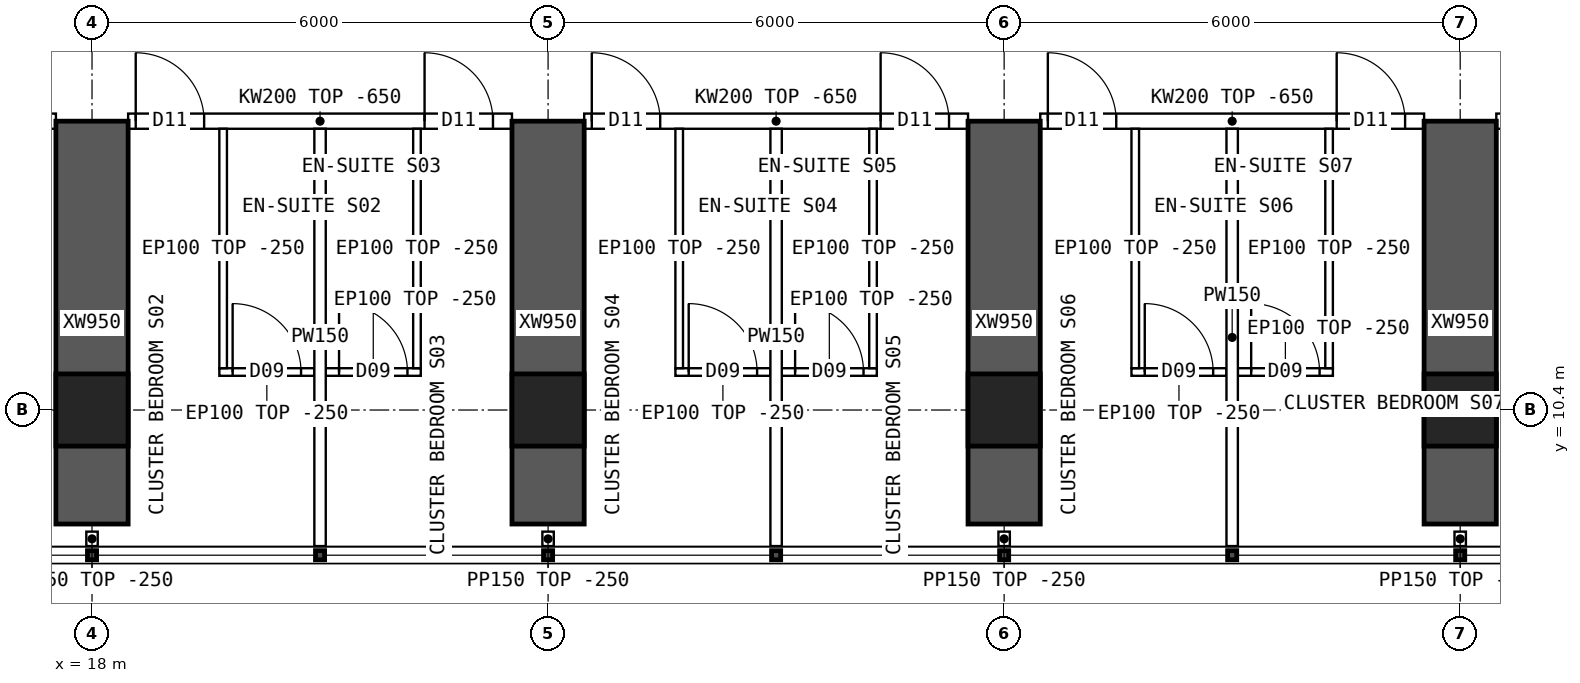
"""IFC4 building model, lengths in metres.
Left out: names, types, materials, properties, quantities, classifications, styles, units other than length and angle.
Written with IfcOpenShell. Run it as: python <this file> out.ifc"""

import sys

from ifc_helpers import new_model, si_unit, direction, frame, frame_2d, origin, origin_2d, place, context, subcontext, project, spatial, polyline, rectangle, hollow_rectangle, outline, extrude, element, fill, save


model = new_model("IFC4")
c1 = context("Model", 3, precision=1e-05, world=origin(), true_north=direction((0.0, 1.0)))
c2 = subcontext(c1, "Body", "Model", "MODEL_VIEW")
j1 = project(units=[si_unit("LENGTHUNIT", "METRE"), si_unit("PLANEANGLEUNIT", "RADIAN")], contexts=[c1])
p1 = place(None, origin())
s1 = spatial("IfcSite", under=j1, at=p1, CompositionType="ELEMENT")
p2 = place(p1, origin())
s2 = spatial("IfcBuilding", under=s1, at=p2, CompositionType="ELEMENT")
p3 = place(p2, frame((0.0, 0.0, 114.4)))
s3 = spatial("IfcBuildingStorey", under=s2, at=p3, CompositionType="ELEMENT", Elevation=114.4)
for number, where, z_axis, x_axis in (
    (1, (18.0, 10.4, 0.0), (0.0, 0.0, 1.0), (1.0, 0.0, 0.0)),
    (2, (24.0, 10.4, 0.0), (0.0, 0.0, 1.0), (1.0, 0.0, 0.0)),
    (3, (30.0, 10.4, 0.0), (0.0, 0.0, 1.0), (1.0, 0.0, 0.0)),
    (4, (36.0, 10.4, 0.0), (0.0, 0.0, 1.0), (1.0, 0.0, 0.0)),
):
    element("IfcColumn", number, at=place(p3, frame(where, z_axis=z_axis, x_axis=x_axis)), inside=s3, PredefinedType="COLUMN", context=c2, shape_type="SweptSolid", body=[
        extrude(hollow_rectangle(XDim=0.95, YDim=0.95, WallThickness=0.095, at=origin_2d()), origin(), (0.0, 0.0, 1.0), 3.75),
    ])
for number, where, z_axis, x_axis in (
    (5, (18.0, 8.9, 0.0), (0.0, 0.0, 1.0), (0.0, 1.0, 0.0)),
    (6, (24.0, 8.9, 0.0), (0.0, 0.0, 1.0), (0.0, 1.0, 0.0)),
    (7, (30.0, 8.9, 0.0), (0.0, 0.0, 1.0), (0.0, 1.0, 0.0)),
    (8, (36.0, 8.9, 0.0), (0.0, 0.0, 1.0), (0.0, 1.0, 0.0)),
):
    element("IfcWall", number, at=place(p3, frame(where, z_axis=z_axis, x_axis=x_axis)), inside=s3, PredefinedType="SHEAR", context=c2, shape_type="SweptSolid", body=[
        extrude(rectangle(XDim=5.3, YDim=0.95, at=frame_2d((2.65, 0.0))), origin(), (0.0, 0.0, 1.0), 3.75),
    ])
p4 = place(p3, frame((12.475, 14.2, 0.0), z_axis=(0.0, 0.0, 1.0), x_axis=(1.0, 0.0, 0.0)))
e9 = element("IfcWall", 9, at=p4, inside=s3, PredefinedType="SOLIDWALL", context=c2, shape_type="SweptSolid", body=[
    extrude(outline(polyline([(0.0, 0.0), (5.05, 0.0), (5.05, 3.1), (0.0, 3.1), (0.0, 0.0)])), frame((0.0, 0.1, 0.0), z_axis=(0.0, -1.0, 0.0), x_axis=(1.0, 0.0, 0.0)), (0.0, 0.0, 1.0), 0.2),
])
p5 = place(p4, frame((0.1, 0.0, 0.0)))
e10 = element("IfcOpeningElement", 10, at=p5, cuts=e9, PredefinedType="OPENING", context=c2, shape_type="SweptSolid", body=[
    extrude(rectangle(XDim=0.9, YDim=2.1, at=frame_2d((0.45, 1.05))), frame((0.0, 0.11, 0.0), z_axis=(0.0, -1.0, 0.0), x_axis=(1.0, 0.0, 0.0)), (0.0, 0.0, 1.0), 0.22),
])
p6 = place(p4, frame((3.9, 0.0, 0.0)))
e11 = element("IfcOpeningElement", 11, at=p6, cuts=e9, PredefinedType="OPENING", context=c2, shape_type="SweptSolid", body=[
    extrude(rectangle(XDim=0.9, YDim=2.1, at=frame_2d((0.45, 1.05))), frame((0.0, 0.11, 0.0), z_axis=(0.0, -1.0, 0.0), x_axis=(1.0, 0.0, 0.0)), (0.0, 0.0, 1.0), 0.22),
])
p7 = place(p3, frame((18.475, 14.2, 0.0), z_axis=(0.0, 0.0, 1.0), x_axis=(1.0, 0.0, 0.0)))
e12 = element("IfcWall", 12, at=p7, inside=s3, PredefinedType="SOLIDWALL", context=c2, shape_type="SweptSolid", body=[
    extrude(outline(polyline([(0.0, 0.0), (5.05, 0.0), (5.05, 3.1), (0.0, 3.1), (0.0, 0.0)])), frame((0.0, 0.1, 0.0), z_axis=(0.0, -1.0, 0.0), x_axis=(1.0, 0.0, 0.0)), (0.0, 0.0, 1.0), 0.2),
])
p8 = place(p7, frame((0.1, 0.0, 0.0)))
e13 = element("IfcOpeningElement", 13, at=p8, cuts=e12, PredefinedType="OPENING", context=c2, shape_type="SweptSolid", body=[
    extrude(rectangle(XDim=0.9, YDim=2.1, at=frame_2d((0.45, 1.05))), frame((0.0, 0.11, 0.0), z_axis=(0.0, -1.0, 0.0), x_axis=(1.0, 0.0, 0.0)), (0.0, 0.0, 1.0), 0.22),
])
p9 = place(p7, frame((3.9, 0.0, 0.0)))
e14 = element("IfcOpeningElement", 14, at=p9, cuts=e12, PredefinedType="OPENING", context=c2, shape_type="SweptSolid", body=[
    extrude(rectangle(XDim=0.9, YDim=2.1, at=frame_2d((0.45, 1.05))), frame((0.0, 0.11, 0.0), z_axis=(0.0, -1.0, 0.0), x_axis=(1.0, 0.0, 0.0)), (0.0, 0.0, 1.0), 0.22),
])
p10 = place(p3, frame((24.475, 14.2, 0.0), z_axis=(0.0, 0.0, 1.0), x_axis=(1.0, 0.0, 0.0)))
e15 = element("IfcWall", 15, at=p10, inside=s3, PredefinedType="SOLIDWALL", context=c2, shape_type="SweptSolid", body=[
    extrude(outline(polyline([(0.0, 0.0), (5.05, 0.0), (5.05, 3.1), (0.0, 3.1), (0.0, 0.0)])), frame((0.0, 0.1, 0.0), z_axis=(0.0, -1.0, 0.0), x_axis=(1.0, 0.0, 0.0)), (0.0, 0.0, 1.0), 0.2),
])
p11 = place(p10, frame((0.1, 0.0, 0.0)))
e16 = element("IfcOpeningElement", 16, at=p11, cuts=e15, PredefinedType="OPENING", context=c2, shape_type="SweptSolid", body=[
    extrude(rectangle(XDim=0.9, YDim=2.1, at=frame_2d((0.45, 1.05))), frame((0.0, 0.11, 0.0), z_axis=(0.0, -1.0, 0.0), x_axis=(1.0, 0.0, 0.0)), (0.0, 0.0, 1.0), 0.22),
])
p12 = place(p10, frame((3.9, 0.0, 0.0)))
e17 = element("IfcOpeningElement", 17, at=p12, cuts=e15, PredefinedType="OPENING", context=c2, shape_type="SweptSolid", body=[
    extrude(rectangle(XDim=0.9, YDim=2.1, at=frame_2d((0.45, 1.05))), frame((0.0, 0.11, 0.0), z_axis=(0.0, -1.0, 0.0), x_axis=(1.0, 0.0, 0.0)), (0.0, 0.0, 1.0), 0.22),
])
p13 = place(p3, frame((30.475, 14.2, 0.0), z_axis=(0.0, 0.0, 1.0), x_axis=(1.0, 0.0, 0.0)))
e18 = element("IfcWall", 18, at=p13, inside=s3, PredefinedType="SOLIDWALL", context=c2, shape_type="SweptSolid", body=[
    extrude(outline(polyline([(0.0, 0.0), (5.05, 0.0), (5.05, 3.1), (0.0, 3.1), (0.0, 0.0)])), frame((0.0, 0.1, 0.0), z_axis=(0.0, -1.0, 0.0), x_axis=(1.0, 0.0, 0.0)), (0.0, 0.0, 1.0), 0.2),
])
p14 = place(p13, frame((0.1, 0.0, 0.0)))
e19 = element("IfcOpeningElement", 19, at=p14, cuts=e18, PredefinedType="OPENING", context=c2, shape_type="SweptSolid", body=[
    extrude(rectangle(XDim=0.9, YDim=2.1, at=frame_2d((0.45, 1.05))), frame((0.0, 0.11, 0.0), z_axis=(0.0, -1.0, 0.0), x_axis=(1.0, 0.0, 0.0)), (0.0, 0.0, 1.0), 0.22),
])
p15 = place(p13, frame((3.9, 0.0, 0.0)))
e20 = element("IfcOpeningElement", 20, at=p15, cuts=e18, PredefinedType="OPENING", context=c2, shape_type="SweptSolid", body=[
    extrude(rectangle(XDim=0.9, YDim=2.1, at=frame_2d((0.45, 1.05))), frame((0.0, 0.11, 0.0), z_axis=(0.0, -1.0, 0.0), x_axis=(1.0, 0.0, 0.0)), (0.0, 0.0, 1.0), 0.22),
])
p16 = place(p3, frame((36.475, 14.2, 0.0), z_axis=(0.0, 0.0, 1.0), x_axis=(1.0, 0.0, 0.0)))
e21 = element("IfcWall", 21, at=p16, inside=s3, PredefinedType="SOLIDWALL", context=c2, shape_type="SweptSolid", body=[
    extrude(outline(polyline([(0.0, 0.0), (5.05, 0.0), (5.05, 3.1), (0.0, 3.1), (0.0, 0.0)])), frame((0.0, 0.1, 0.0), z_axis=(0.0, -1.0, 0.0), x_axis=(1.0, 0.0, 0.0)), (0.0, 0.0, 1.0), 0.2),
])
p17 = place(p16, frame((0.3, 0.0, 0.0)))
e22 = element("IfcOpeningElement", 22, at=p17, cuts=e21, PredefinedType="OPENING", context=c2, shape_type="SweptSolid", body=[
    extrude(rectangle(XDim=1.0, YDim=2.1, at=frame_2d((0.5, 1.05))), frame((0.0, 0.11, 0.0), z_axis=(0.0, -1.0, 0.0), x_axis=(1.0, 0.0, 0.0)), (0.0, 0.0, 1.0), 0.22),
])
p18 = place(p3, frame((21.0, 8.61, 0.0), z_axis=(0.0, 0.0, 1.0), x_axis=(0.0, 1.0, 0.0)))
e23 = element("IfcWall", 23, at=p18, inside=s3, PredefinedType="PARTITIONING", context=c2, shape_type="SweptSolid", body=[
    extrude(outline(polyline([(0.0, 0.0), (5.49, 0.0), (5.49, 3.1), (5.442, 3.1), (5.44, 3.5), (1.992, 3.5), (1.99, 3.1), (1.592, 3.1), (1.59, 3.5), (0.0, 3.5), (0.0, 0.0)])), frame((0.0, 0.075, 0.0), z_axis=(0.0, -1.0, 0.0), x_axis=(1.0, 0.0, 0.0)), (0.0, 0.0, 1.0), 0.15),
])
p19 = place(p3, frame((20.925, 10.9, 0.0), z_axis=(0.0, 0.0, 1.0), x_axis=(-1.0, 0.0, 0.0)))
e24 = element("IfcWall", 24, at=p19, inside=s3, PredefinedType="PARTITIONING", context=c2, shape_type="SweptSolid", body=[
    extrude(rectangle(XDim=1.25, YDim=0.1, at=frame_2d((0.625, 0.0))), origin(), (0.0, 0.0, 1.0), 3.5),
])
p20 = place(p19, frame((0.175, 0.0, 0.0)))
e25 = element("IfcOpeningElement", 25, at=p20, cuts=e24, PredefinedType="OPENING", context=c2, shape_type="SweptSolid", body=[
    extrude(rectangle(XDim=0.9, YDim=2.1, at=frame_2d((0.45, 1.05))), frame((0.0, 0.06, 0.0), z_axis=(0.0, -1.0, 0.0), x_axis=(1.0, 0.0, 0.0)), (0.0, 0.0, 1.0), 0.12),
])
p21 = place(p3, frame((19.725, 10.95, 0.0), z_axis=(0.0, 0.0, 1.0), x_axis=(0.0, 1.0, 0.0)))
e26 = element("IfcWall", 26, at=p21, inside=s3, PredefinedType="PARTITIONING", context=c2, shape_type="SweptSolid", body=[
    extrude(outline(polyline([(0.0, 0.0), (3.15, 0.0), (3.15, 3.1), (3.102, 3.1), (3.1, 3.5), (0.0, 3.5), (0.0, 0.0)])), frame((0.0, 0.05, 0.0), z_axis=(0.0, -1.0, 0.0), x_axis=(1.0, 0.0, 0.0)), (0.0, 0.0, 1.0), 0.1),
])
p22 = place(p3, frame((22.325, 10.9, 0.0), z_axis=(0.0, 0.0, 1.0), x_axis=(-1.0, 0.0, 0.0)))
e27 = element("IfcWall", 27, at=p22, inside=s3, PredefinedType="PARTITIONING", context=c2, shape_type="SweptSolid", body=[
    extrude(rectangle(XDim=1.25, YDim=0.1, at=frame_2d((0.625, 0.0))), origin(), (0.0, 0.0, 1.0), 3.5),
])
p23 = place(p22, frame((0.175, 0.0, 0.0)))
e28 = element("IfcOpeningElement", 28, at=p23, cuts=e27, PredefinedType="OPENING", context=c2, shape_type="SweptSolid", body=[
    extrude(rectangle(XDim=0.9, YDim=2.1, at=frame_2d((0.45, 1.05))), frame((0.0, 0.06, 0.0), z_axis=(0.0, -1.0, 0.0), x_axis=(1.0, 0.0, 0.0)), (0.0, 0.0, 1.0), 0.12),
])
p24 = place(p3, frame((22.275, 10.95, 0.0), z_axis=(0.0, 0.0, 1.0), x_axis=(0.0, 1.0, 0.0)))
e29 = element("IfcWall", 29, at=p24, inside=s3, PredefinedType="PARTITIONING", context=c2, shape_type="SweptSolid", body=[
    extrude(outline(polyline([(0.0, 0.0), (3.15, 0.0), (3.15, 3.1), (3.102, 3.1), (3.1, 3.5), (0.0, 3.5), (0.0, 0.0)])), frame((0.0, 0.05, 0.0), z_axis=(0.0, -1.0, 0.0), x_axis=(1.0, 0.0, 0.0)), (0.0, 0.0, 1.0), 0.1),
])
p25 = place(p3, frame((27.0, 8.61, 0.0), z_axis=(0.0, 0.0, 1.0), x_axis=(0.0, 1.0, 0.0)))
e30 = element("IfcWall", 30, at=p25, inside=s3, PredefinedType="PARTITIONING", context=c2, shape_type="SweptSolid", body=[
    extrude(outline(polyline([(0.0, 0.0), (5.49, 0.0), (5.49, 3.1), (5.442, 3.1), (5.44, 3.5), (1.992, 3.5), (1.99, 3.1), (1.592, 3.1), (1.59, 3.5), (0.0, 3.5), (0.0, 0.0)])), frame((0.0, 0.075, 0.0), z_axis=(0.0, -1.0, 0.0), x_axis=(1.0, 0.0, 0.0)), (0.0, 0.0, 1.0), 0.15),
])
p26 = place(p3, frame((26.925, 10.9, 0.0), z_axis=(0.0, 0.0, 1.0), x_axis=(-1.0, 0.0, 0.0)))
e31 = element("IfcWall", 31, at=p26, inside=s3, PredefinedType="PARTITIONING", context=c2, shape_type="SweptSolid", body=[
    extrude(rectangle(XDim=1.25, YDim=0.1, at=frame_2d((0.625, 0.0))), origin(), (0.0, 0.0, 1.0), 3.5),
])
p27 = place(p26, frame((0.175, 0.0, 0.0)))
e32 = element("IfcOpeningElement", 32, at=p27, cuts=e31, PredefinedType="OPENING", context=c2, shape_type="SweptSolid", body=[
    extrude(rectangle(XDim=0.9, YDim=2.1, at=frame_2d((0.45, 1.05))), frame((0.0, 0.06, 0.0), z_axis=(0.0, -1.0, 0.0), x_axis=(1.0, 0.0, 0.0)), (0.0, 0.0, 1.0), 0.12),
])
p28 = place(p3, frame((25.725, 10.95, 0.0), z_axis=(0.0, 0.0, 1.0), x_axis=(0.0, 1.0, 0.0)))
e33 = element("IfcWall", 33, at=p28, inside=s3, PredefinedType="PARTITIONING", context=c2, shape_type="SweptSolid", body=[
    extrude(outline(polyline([(0.0, 0.0), (3.15, 0.0), (3.15, 3.1), (3.102, 3.1), (3.1, 3.5), (0.0, 3.5), (0.0, 0.0)])), frame((0.0, 0.05, 0.0), z_axis=(0.0, -1.0, 0.0), x_axis=(1.0, 0.0, 0.0)), (0.0, 0.0, 1.0), 0.1),
])
p29 = place(p3, frame((28.325, 10.9, 0.0), z_axis=(0.0, 0.0, 1.0), x_axis=(-1.0, 0.0, 0.0)))
e34 = element("IfcWall", 34, at=p29, inside=s3, PredefinedType="PARTITIONING", context=c2, shape_type="SweptSolid", body=[
    extrude(rectangle(XDim=1.25, YDim=0.1, at=frame_2d((0.625, 0.0))), origin(), (0.0, 0.0, 1.0), 3.5),
])
p30 = place(p29, frame((0.175, 0.0, 0.0)))
e35 = element("IfcOpeningElement", 35, at=p30, cuts=e34, PredefinedType="OPENING", context=c2, shape_type="SweptSolid", body=[
    extrude(rectangle(XDim=0.9, YDim=2.1, at=frame_2d((0.45, 1.05))), frame((0.0, 0.06, 0.0), z_axis=(0.0, -1.0, 0.0), x_axis=(1.0, 0.0, 0.0)), (0.0, 0.0, 1.0), 0.12),
])
p31 = place(p3, frame((28.275, 10.95, 0.0), z_axis=(0.0, 0.0, 1.0), x_axis=(0.0, 1.0, 0.0)))
e36 = element("IfcWall", 36, at=p31, inside=s3, PredefinedType="PARTITIONING", context=c2, shape_type="SweptSolid", body=[
    extrude(outline(polyline([(0.0, 0.0), (3.15, 0.0), (3.15, 3.1), (3.102, 3.1), (3.1, 3.5), (0.0, 3.5), (0.0, 0.0)])), frame((0.0, 0.05, 0.0), z_axis=(0.0, -1.0, 0.0), x_axis=(1.0, 0.0, 0.0)), (0.0, 0.0, 1.0), 0.1),
])
p32 = place(p3, frame((33.0, 8.61, 0.0), z_axis=(0.0, 0.0, 1.0), x_axis=(0.0, 1.0, 0.0)))
e37 = element("IfcWall", 37, at=p32, inside=s3, PredefinedType="PARTITIONING", context=c2, shape_type="SweptSolid", body=[
    extrude(outline(polyline([(0.0, 0.0), (5.49, 0.0), (5.49, 3.1), (5.442, 3.1), (5.44, 3.5), (1.992, 3.5), (1.99, 3.1), (1.592, 3.1), (1.59, 3.5), (0.0, 3.5), (0.0, 0.0)])), frame((0.0, 0.075, 0.0), z_axis=(0.0, -1.0, 0.0), x_axis=(1.0, 0.0, 0.0)), (0.0, 0.0, 1.0), 0.15),
])
p33 = place(p3, frame((32.925, 10.9, 0.0), z_axis=(0.0, 0.0, 1.0), x_axis=(-1.0, 0.0, 0.0)))
e38 = element("IfcWall", 38, at=p33, inside=s3, PredefinedType="PARTITIONING", context=c2, shape_type="SweptSolid", body=[
    extrude(rectangle(XDim=1.25, YDim=0.1, at=frame_2d((0.625, 0.0))), origin(), (0.0, 0.0, 1.0), 3.5),
])
p34 = place(p33, frame((0.175, 0.0, 0.0)))
e39 = element("IfcOpeningElement", 39, at=p34, cuts=e38, PredefinedType="OPENING", context=c2, shape_type="SweptSolid", body=[
    extrude(rectangle(XDim=0.9, YDim=2.1, at=frame_2d((0.45, 1.05))), frame((0.0, 0.06, 0.0), z_axis=(0.0, -1.0, 0.0), x_axis=(1.0, 0.0, 0.0)), (0.0, 0.0, 1.0), 0.12),
])
p35 = place(p3, frame((31.725, 10.95, 0.0), z_axis=(0.0, 0.0, 1.0), x_axis=(0.0, 1.0, 0.0)))
e40 = element("IfcWall", 40, at=p35, inside=s3, PredefinedType="PARTITIONING", context=c2, shape_type="SweptSolid", body=[
    extrude(outline(polyline([(0.0, 0.0), (3.15, 0.0), (3.15, 3.1), (3.102, 3.1), (3.1, 3.5), (0.0, 3.5), (0.0, 0.0)])), frame((0.0, 0.05, 0.0), z_axis=(0.0, -1.0, 0.0), x_axis=(1.0, 0.0, 0.0)), (0.0, 0.0, 1.0), 0.1),
])
p36 = place(p3, frame((34.325, 10.9, 0.0), z_axis=(0.0, 0.0, 1.0), x_axis=(-1.0, 0.0, 0.0)))
e41 = element("IfcWall", 41, at=p36, inside=s3, PredefinedType="PARTITIONING", context=c2, shape_type="SweptSolid", body=[
    extrude(rectangle(XDim=1.25, YDim=0.1, at=frame_2d((0.625, 0.0))), origin(), (0.0, 0.0, 1.0), 3.5),
])
p37 = place(p36, frame((0.175, 0.0, 0.0)))
e42 = element("IfcOpeningElement", 42, at=p37, cuts=e41, PredefinedType="OPENING", context=c2, shape_type="SweptSolid", body=[
    extrude(rectangle(XDim=0.9, YDim=2.1, at=frame_2d((0.45, 1.05))), frame((0.0, 0.06, 0.0), z_axis=(0.0, -1.0, 0.0), x_axis=(1.0, 0.0, 0.0)), (0.0, 0.0, 1.0), 0.12),
])
p38 = place(p3, frame((34.275, 10.95, 0.0), z_axis=(0.0, 0.0, 1.0), x_axis=(0.0, 1.0, 0.0)))
e43 = element("IfcWall", 43, at=p38, inside=s3, PredefinedType="PARTITIONING", context=c2, shape_type="SweptSolid", body=[
    extrude(outline(polyline([(0.0, 0.0), (3.15, 0.0), (3.15, 3.1), (3.102, 3.1), (3.1, 3.5), (0.0, 3.5), (0.0, 0.0)])), frame((0.0, 0.05, 0.0), z_axis=(0.0, -1.0, 0.0), x_axis=(1.0, 0.0, 0.0)), (0.0, 0.0, 1.0), 0.1),
])
for number, where, z_axis, x_axis in (
    (44, (18.0, 8.8, 0.0), (0.0, 0.0, 1.0), (0.0, -1.0, 0.0)),
    (45, (24.0, 8.8, 0.0), (0.0, 0.0, 1.0), (0.0, -1.0, 0.0)),
    (46, (30.0, 8.8, 0.0), (0.0, 0.0, 1.0), (0.0, -1.0, 0.0)),
    (47, (36.0, 8.8, 0.0), (0.0, 0.0, 1.0), (0.0, -1.0, 0.0)),
):
    element("IfcWall", number, at=place(p3, frame(where, z_axis=z_axis, x_axis=x_axis)), inside=s3, PredefinedType="PARTITIONING", context=c2, shape_type="SweptSolid", body=[
        extrude(rectangle(XDim=0.19, YDim=0.15, at=frame_2d((0.095, 0.0))), origin(), (0.0, 0.0, 1.0), 3.5),
    ])
p39 = place(p20, origin())
e48 = element("IfcDoor", 48, at=p39, inside=s3, OperationType="SINGLE_SWING_RIGHT", PredefinedType="DOOR", context=c2, shape_type="SweptSolid", body=[
    extrude(rectangle(XDim=0.9, YDim=2.1, at=frame_2d((0.45, 1.05))), frame((0.0, 0.025, 0.0), z_axis=(0.0, -1.0, 0.0), x_axis=(1.0, 0.0, 0.0)), (0.0, 0.0, 1.0), 0.05),
])
fill(e25, e48)
p40 = place(p8, origin())
e49 = element("IfcDoor", 49, at=p40, inside=s3, OperationType="SINGLE_SWING_LEFT", PredefinedType="DOOR", context=c2, shape_type="SweptSolid", body=[
    extrude(rectangle(XDim=0.9, YDim=2.1, at=frame_2d((0.45, 1.05))), frame((0.0, 0.025, 0.0), z_axis=(0.0, -1.0, 0.0), x_axis=(1.0, 0.0, 0.0)), (0.0, 0.0, 1.0), 0.05),
])
fill(e13, e49)
p41 = place(p23, origin())
e50 = element("IfcDoor", 50, at=p41, inside=s3, OperationType="SINGLE_SWING_RIGHT", PredefinedType="DOOR", context=c2, shape_type="SweptSolid", body=[
    extrude(rectangle(XDim=0.9, YDim=2.1, at=frame_2d((0.45, 1.05))), frame((0.0, 0.025, 0.0), z_axis=(0.0, -1.0, 0.0), x_axis=(1.0, 0.0, 0.0)), (0.0, 0.0, 1.0), 0.05),
])
fill(e28, e50)
p42 = place(p9, origin())
e51 = element("IfcDoor", 51, at=p42, inside=s3, OperationType="SINGLE_SWING_LEFT", PredefinedType="DOOR", context=c2, shape_type="SweptSolid", body=[
    extrude(rectangle(XDim=0.9, YDim=2.1, at=frame_2d((0.45, 1.05))), frame((0.0, 0.025, 0.0), z_axis=(0.0, -1.0, 0.0), x_axis=(1.0, 0.0, 0.0)), (0.0, 0.0, 1.0), 0.05),
])
fill(e14, e51)
p43 = place(p27, origin())
e52 = element("IfcDoor", 52, at=p43, inside=s3, OperationType="SINGLE_SWING_RIGHT", PredefinedType="DOOR", context=c2, shape_type="SweptSolid", body=[
    extrude(rectangle(XDim=0.9, YDim=2.1, at=frame_2d((0.45, 1.05))), frame((0.0, 0.025, 0.0), z_axis=(0.0, -1.0, 0.0), x_axis=(1.0, 0.0, 0.0)), (0.0, 0.0, 1.0), 0.05),
])
fill(e32, e52)
p44 = place(p11, origin())
e53 = element("IfcDoor", 53, at=p44, inside=s3, OperationType="SINGLE_SWING_LEFT", PredefinedType="DOOR", context=c2, shape_type="SweptSolid", body=[
    extrude(rectangle(XDim=0.9, YDim=2.1, at=frame_2d((0.45, 1.05))), frame((0.0, 0.025, 0.0), z_axis=(0.0, -1.0, 0.0), x_axis=(1.0, 0.0, 0.0)), (0.0, 0.0, 1.0), 0.05),
])
fill(e16, e53)
p45 = place(p30, origin())
e54 = element("IfcDoor", 54, at=p45, inside=s3, OperationType="SINGLE_SWING_RIGHT", PredefinedType="DOOR", context=c2, shape_type="SweptSolid", body=[
    extrude(rectangle(XDim=0.9, YDim=2.1, at=frame_2d((0.45, 1.05))), frame((0.0, 0.025, 0.0), z_axis=(0.0, -1.0, 0.0), x_axis=(1.0, 0.0, 0.0)), (0.0, 0.0, 1.0), 0.05),
])
fill(e35, e54)
p46 = place(p12, origin())
e55 = element("IfcDoor", 55, at=p46, inside=s3, OperationType="SINGLE_SWING_LEFT", PredefinedType="DOOR", context=c2, shape_type="SweptSolid", body=[
    extrude(rectangle(XDim=0.9, YDim=2.1, at=frame_2d((0.45, 1.05))), frame((0.0, 0.025, 0.0), z_axis=(0.0, -1.0, 0.0), x_axis=(1.0, 0.0, 0.0)), (0.0, 0.0, 1.0), 0.05),
])
fill(e17, e55)
p47 = place(p34, origin())
e56 = element("IfcDoor", 56, at=p47, inside=s3, OperationType="SINGLE_SWING_RIGHT", PredefinedType="DOOR", context=c2, shape_type="SweptSolid", body=[
    extrude(rectangle(XDim=0.9, YDim=2.1, at=frame_2d((0.45, 1.05))), frame((0.0, 0.025, 0.0), z_axis=(0.0, -1.0, 0.0), x_axis=(1.0, 0.0, 0.0)), (0.0, 0.0, 1.0), 0.05),
])
fill(e39, e56)
p48 = place(p14, origin())
e57 = element("IfcDoor", 57, at=p48, inside=s3, OperationType="SINGLE_SWING_LEFT", PredefinedType="DOOR", context=c2, shape_type="SweptSolid", body=[
    extrude(rectangle(XDim=0.9, YDim=2.1, at=frame_2d((0.45, 1.05))), frame((0.0, 0.025, 0.0), z_axis=(0.0, -1.0, 0.0), x_axis=(1.0, 0.0, 0.0)), (0.0, 0.0, 1.0), 0.05),
])
fill(e19, e57)
p49 = place(p37, origin())
e58 = element("IfcDoor", 58, at=p49, inside=s3, OperationType="SINGLE_SWING_RIGHT", PredefinedType="DOOR", context=c2, shape_type="SweptSolid", body=[
    extrude(rectangle(XDim=0.9, YDim=2.1, at=frame_2d((0.45, 1.05))), frame((0.0, 0.025, 0.0), z_axis=(0.0, -1.0, 0.0), x_axis=(1.0, 0.0, 0.0)), (0.0, 0.0, 1.0), 0.05),
])
fill(e42, e58)
p50 = place(p15, origin())
e59 = element("IfcDoor", 59, at=p50, inside=s3, OperationType="SINGLE_SWING_LEFT", PredefinedType="DOOR", context=c2, shape_type="SweptSolid", body=[
    extrude(rectangle(XDim=0.9, YDim=2.1, at=frame_2d((0.45, 1.05))), frame((0.0, 0.025, 0.0), z_axis=(0.0, -1.0, 0.0), x_axis=(1.0, 0.0, 0.0)), (0.0, 0.0, 1.0), 0.05),
])
fill(e20, e59)
save(model, sys.argv[1])
